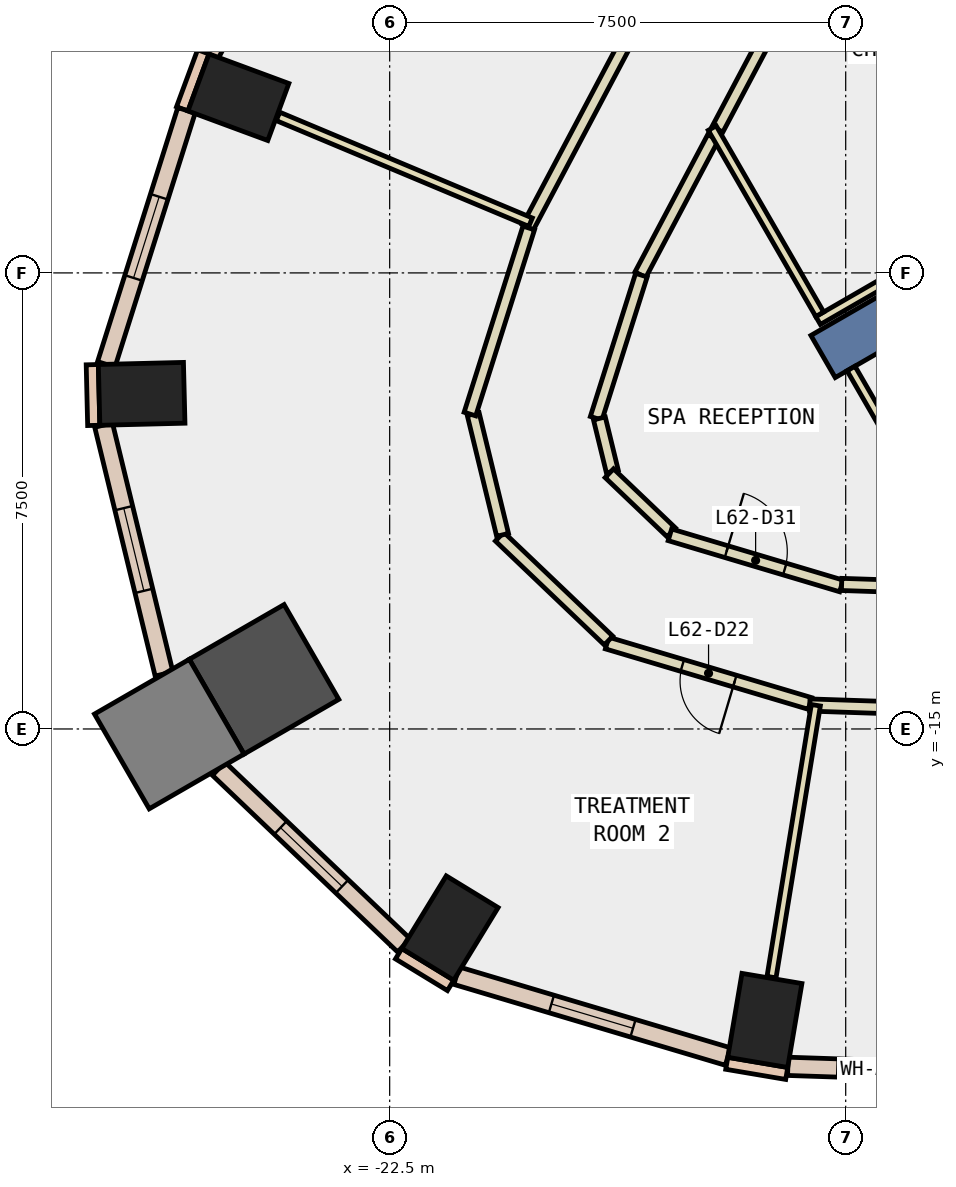
"""IFC4 building model, lengths in metres.
Left out: names, types, materials, properties, quantities, classifications, styles, units other than length and angle.
Written with IfcOpenShell. Run it as: python <this file> out.ifc"""

import sys

from ifc_helpers import new_model, si_unit, direction, frame, frame_2d, origin, origin_2d, place, context, subcontext, project, spatial, rectangle, extrude, element, fill, save


model = new_model("IFC4")
c1 = context("Model", 3, precision=1e-05, world=origin(), true_north=direction((0.0, 1.0)))
c2 = subcontext(c1, "Body", "Model", "MODEL_VIEW")
j1 = project(units=[si_unit("LENGTHUNIT", "METRE"), si_unit("PLANEANGLEUNIT", "RADIAN")], contexts=[c1])
p1 = place(None, origin())
s1 = spatial("IfcSite", under=j1, at=p1, CompositionType="ELEMENT")
p2 = place(p1, origin())
s2 = spatial("IfcBuilding", under=s1, at=p2, CompositionType="ELEMENT")
p3 = place(p2, frame((0.0, 0.0, 270.2)))
s3 = spatial("IfcBuildingStorey", under=s2, at=p3, CompositionType="ELEMENT", Elevation=270.2)
for number, where, z_axis, x_axis in (
    (1, (-16.33, -19.793, -0.34), (0.0, 0.0, 1.0), (-0.986, 0.167, 0.0)),
    (2, (-24.988, -4.611, -0.34), (0.0, 0.0, 1.0), (0.347, 0.938, 0.0)),
    (3, (-26.579, -9.489, -0.34), (0.0, 0.0, 1.0), (-0.025, 1.0, 0.0)),
):
    element("IfcColumn", number, at=place(p3, frame(where, z_axis=z_axis, x_axis=x_axis)), inside=s3, PredefinedType="COLUMN", context=c2, shape_type="SweptSolid", body=[
        extrude(rectangle(XDim=1.0, YDim=1.4, at=origin_2d()), origin(), (0.0, 0.0, 1.0), 3.6),
    ])
p4 = place(p3, frame((-24.566, -14.184, -0.34), z_axis=(0.0, 0.0, 1.0), x_axis=(0.866025403784, 0.5, 0.0)))
e4 = element("IfcColumn", 4, at=p4, inside=s3, PredefinedType="COLUMN", context=c2, shape_type="SweptSolid", body=[
    extrude(rectangle(XDim=1.8, YDim=1.8, at=origin_2d()), origin(), (0.0, 0.0, 1.0), 3.6),
])
p5 = place(p3, frame((-21.508, -18.274, -0.34), z_axis=(0.0, 0.0, 1.0), x_axis=(-0.853341581839, 0.521352227103, 0.0)))
e5 = element("IfcColumn", 5, at=p5, inside=s3, PredefinedType="COLUMN", context=c2, shape_type="SweptSolid", body=[
    extrude(rectangle(XDim=1.0, YDim=1.4, at=origin_2d()), origin(), (0.0, 0.0, 1.0), 3.6),
])
p6 = place(p3, frame((-26.125, -15.084, -0.34), z_axis=(0.0, 0.0, 1.0), x_axis=(0.866025403784, 0.5, 0.0)))
e6 = element("IfcColumn", 6, at=p6, inside=s3, PredefinedType="COLUMN", context=c2, shape_type="SweptSolid", body=[
    extrude(rectangle(XDim=1.8, YDim=1.8, at=origin_2d()), origin(), (0.0, 0.0, 1.0), 3.6),
])
p7 = place(p3, frame((-7.578, -4.375, -0.34), z_axis=(0.0, 0.0, 1.0), x_axis=(-0.866024315419, -0.5000018851, 0.0)))
e7 = element("IfcWall", 7, at=p7, inside=s3, PredefinedType="SHEAR", context=c2, shape_type="SweptSolid", body=[
    extrude(rectangle(XDim=9.0, YDim=0.8, at=frame_2d((4.5, 0.0))), origin(), (0.0, 0.0, 1.0), 3.6),
])
for number, where, z_axis, x_axis in (
    (8, (-25.565, -3.865, 0.0), (0.0, 0.0, 1.0), (-0.347, -0.938, 0.0)),
    (9, (-16.956, -20.498, 0.0), (0.0, 0.0, 1.0), (0.986, -0.167, 0.0)),
):
    element("IfcWall", number, at=place(p3, frame(where, z_axis=z_axis, x_axis=x_axis)), inside=s3, PredefinedType="STANDARD", context=c2, shape_type="SweptSolid", body=[
        extrude(rectangle(XDim=1.0, YDim=0.2, at=frame_2d((0.5, 0.0))), origin(), (0.0, 0.0, 1.0), 3.26),
    ])
p8 = place(p3, frame((-27.391, -9.009, 0.0), z_axis=(0.0, 0.0, 1.0), x_axis=(0.024186470916, -0.999707464524, 0.0)))
e10 = element("IfcWall", 10, at=p8, inside=s3, PredefinedType="STANDARD", context=c2, shape_type="SweptSolid", body=[
    extrude(rectangle(XDim=0.999, YDim=0.2, at=frame_2d((0.5, 0.0))), origin(), (0.0, 0.0, 1.0), 3.26),
])
p9 = place(p3, frame((-22.352, -18.696, 0.0), z_axis=(0.0, 0.0, 1.0), x_axis=(0.853679739553, -0.520798331677, 0.0)))
e11 = element("IfcWall", 11, at=p9, inside=s3, PredefinedType="STANDARD", context=c2, shape_type="SweptSolid", body=[
    extrude(rectangle(XDim=1.0, YDim=0.2, at=frame_2d((0.5, 0.0))), origin(), (0.0, 0.0, 1.0), 3.26),
])
p10 = place(p3, frame((-15.951, -20.548, 0.0), z_axis=(0.0, 0.0, 1.0), x_axis=(0.999450376985, -0.033150323459, 0.0)))
e12 = element("IfcWall", 12, at=p10, inside=s3, PredefinedType="STANDARD", context=c2, shape_type="SweptSolid", body=[
    extrude(rectangle(XDim=7.659, YDim=0.3, at=frame_2d((3.83, 0.0))), origin(), (0.0, 0.0, 1.0), 3.26),
])
p11 = place(p10, frame((0.815, 0.0, 0.9)))
e13 = element("IfcOpeningElement", 13, at=p11, cuts=e12, PredefinedType="OPENING", context=c2, shape_type="SweptSolid", body=[
    extrude(rectangle(XDim=2.2, YDim=2.0, at=frame_2d((1.1, 1.0))), frame((0.0, 0.16, 0.0), z_axis=(0.0, -1.0, 0.0), x_axis=(1.0, 0.0, 0.0)), (0.0, 0.0, 1.0), 0.32),
])
p12 = place(p10, frame((4.644, 0.0, 0.9)))
e14 = element("IfcOpeningElement", 14, at=p12, cuts=e12, PredefinedType="OPENING", context=c2, shape_type="SweptSolid", body=[
    extrude(rectangle(XDim=2.2, YDim=2.0, at=frame_2d((1.1, 1.0))), frame((0.0, 0.16, 0.0), z_axis=(0.0, -1.0, 0.0), x_axis=(1.0, 0.0, 0.0)), (0.0, 0.0, 1.0), 0.32),
])
p13 = place(p3, frame((-22.784, 1.132, 0.0), z_axis=(0.0, 0.0, 1.0), x_axis=(-0.468220106253, -0.883611867338, 0.0)))
e15 = element("IfcWall", 15, at=p13, inside=s3, PredefinedType="STANDARD", context=c2, shape_type="SweptSolid", body=[
    extrude(rectangle(XDim=5.703, YDim=0.3, at=frame_2d((2.852, 0.0))), origin(), (0.0, 0.0, 1.0), 3.26),
])
p14 = place(p13, frame((0.476, 0.0, 0.9)))
e16 = element("IfcOpeningElement", 16, at=p14, cuts=e15, PredefinedType="OPENING", context=c2, shape_type="SweptSolid", body=[
    extrude(rectangle(XDim=1.9, YDim=2.0, at=frame_2d((0.95, 1.0))), frame((0.0, 0.16, 0.0), z_axis=(0.0, -1.0, 0.0), x_axis=(1.0, 0.0, 0.0)), (0.0, 0.0, 1.0), 0.32),
])
p15 = place(p13, frame((3.327, 0.0, 0.9)))
e17 = element("IfcOpeningElement", 17, at=p15, cuts=e15, PredefinedType="OPENING", context=c2, shape_type="SweptSolid", body=[
    extrude(rectangle(XDim=1.9, YDim=2.0, at=frame_2d((0.95, 1.0))), frame((0.0, 0.16, 0.0), z_axis=(0.0, -1.0, 0.0), x_axis=(1.0, 0.0, 0.0)), (0.0, 0.0, 1.0), 0.32),
])
p16 = place(p3, frame((-25.842, -4.827, 0.0), z_axis=(0.0, 0.0, 1.0), x_axis=(-0.30108868778, -0.953596142028, 0.0)))
e18 = element("IfcWall", 18, at=p16, inside=s3, PredefinedType="STANDARD", context=c2, shape_type="SweptSolid", body=[
    extrude(rectangle(XDim=4.38, YDim=0.3, at=frame_2d((2.19, 0.0))), origin(), (0.0, 0.0, 1.0), 3.26),
])
p17 = place(p16, frame((1.49, 0.0, 0.9)))
e19 = element("IfcOpeningElement", 19, at=p17, cuts=e18, PredefinedType="OPENING", context=c2, shape_type="SweptSolid", body=[
    extrude(rectangle(XDim=1.4, YDim=2.0, at=frame_2d((0.7, 1.0))), frame((0.0, 0.16, 0.0), z_axis=(0.0, -1.0, 0.0), x_axis=(1.0, 0.0, 0.0)), (0.0, 0.0, 1.0), 0.32),
])
p18 = place(p3, frame((-27.205, -10.003, 0.0), z_axis=(0.0, 0.0, 1.0), x_axis=(0.236077883519, -0.97173413695, 0.0)))
e20 = element("IfcWall", 20, at=p18, inside=s3, PredefinedType="STANDARD", context=c2, shape_type="SweptSolid", body=[
    extrude(rectangle(XDim=4.211, YDim=0.3, at=frame_2d((2.105, 0.0))), origin(), (0.0, 0.0, 1.0), 3.26),
])
p19 = place(p18, frame((1.405, 0.0, 0.9)))
e21 = element("IfcOpeningElement", 21, at=p19, cuts=e20, PredefinedType="OPENING", context=c2, shape_type="SweptSolid", body=[
    extrude(rectangle(XDim=1.4, YDim=2.0, at=frame_2d((0.7, 1.0))), frame((0.0, 0.16, 0.0), z_axis=(0.0, -1.0, 0.0), x_axis=(1.0, 0.0, 0.0)), (0.0, 0.0, 1.0), 0.32),
])
p20 = place(p3, frame((-25.312, -15.653, 0.0), z_axis=(0.0, 0.0, 1.0), x_axis=(0.723526681061, -0.690296415892, 0.0)))
e22 = element("IfcWall", 22, at=p20, inside=s3, PredefinedType="STANDARD", context=c2, shape_type="SweptSolid", body=[
    extrude(rectangle(XDim=4.21, YDim=0.3, at=frame_2d((2.105, 0.0))), origin(), (0.0, 0.0, 1.0), 3.26),
])
p21 = place(p20, frame((1.405, 0.0, 0.9)))
e23 = element("IfcOpeningElement", 23, at=p21, cuts=e22, PredefinedType="OPENING", context=c2, shape_type="SweptSolid", body=[
    extrude(rectangle(XDim=1.4, YDim=2.0, at=frame_2d((0.7, 1.0))), frame((0.0, 0.16, 0.0), z_axis=(0.0, -1.0, 0.0), x_axis=(1.0, 0.0, 0.0)), (0.0, 0.0, 1.0), 0.32),
])
p22 = place(p3, frame((-21.401, -19.057, 0.0), z_axis=(0.0, 0.0, 1.0), x_axis=(0.958361270465, -0.285558532131, 0.0)))
e24 = element("IfcWall", 24, at=p22, inside=s3, PredefinedType="STANDARD", context=c2, shape_type="SweptSolid", body=[
    extrude(rectangle(XDim=4.658, YDim=0.3, at=frame_2d((2.329, 0.0))), origin(), (0.0, 0.0, 1.0), 3.26),
])
p23 = place(p22, frame((1.629, 0.0, 0.9)))
e25 = element("IfcOpeningElement", 25, at=p23, cuts=e24, PredefinedType="OPENING", context=c2, shape_type="SweptSolid", body=[
    extrude(rectangle(XDim=1.4, YDim=2.0, at=frame_2d((0.7, 1.0))), frame((0.0, 0.16, 0.0), z_axis=(0.0, -1.0, 0.0), x_axis=(1.0, 0.0, 0.0)), (0.0, 0.0, 1.0), 0.32),
])
p24 = place(p3, frame((-15.56, -2.214, 0.0), z_axis=(0.0, 0.0, 1.0), x_axis=(-0.468104679961, -0.883673021314, 0.0)))
e26 = element("IfcWall", 26, at=p24, inside=s3, PredefinedType="PARTITIONING", context=c2, shape_type="SweptSolid", body=[
    extrude(rectangle(XDim=3.309, YDim=0.2, at=frame_2d((1.654, 0.0))), origin(), (0.0, 0.0, 1.0), 3.26),
])
p25 = place(p3, frame((-17.18, -5.271, 0.0), z_axis=(0.0, 0.0, 1.0), x_axis=(-0.468212372113, -0.883615965564, 0.0)))
e27 = element("IfcWall", 27, at=p25, inside=s3, PredefinedType="PARTITIONING", context=c2, shape_type="SweptSolid", body=[
    extrude(rectangle(XDim=2.557, YDim=0.2, at=frame_2d((1.278, 0.0))), origin(), (0.0, 0.0, 1.0), 3.26),
])
p26 = place(p3, frame((-18.36, -7.537, 0.0), z_axis=(0.0, 0.0, 1.0), x_axis=(-0.301325410186, -0.953521366922, 0.0)))
e28 = element("IfcWall", 28, at=p26, inside=s3, PredefinedType="PARTITIONING", context=c2, shape_type="SweptSolid", body=[
    extrude(rectangle(XDim=2.469, YDim=0.2, at=frame_2d((1.234, 0.0))), origin(), (0.0, 0.0, 1.0), 3.26),
])
p27 = place(p3, frame((-19.051, -9.893, 0.0), z_axis=(0.0, 0.0, 1.0), x_axis=(0.237162553963, -0.971469980492, 0.0)))
e29 = element("IfcWall", 29, at=p27, inside=s3, PredefinedType="PARTITIONING", context=c2, shape_type="SweptSolid", body=[
    extrude(rectangle(XDim=0.899, YDim=0.2, at=frame_2d((0.449, 0.0))), origin(), (0.0, 0.0, 1.0), 3.26),
])
p28 = place(p3, frame((-18.887, -10.794, 0.0), z_axis=(0.0, 0.0, 1.0), x_axis=(0.723206051435, -0.690632324155, 0.0)))
e30 = element("IfcWall", 30, at=p28, inside=s3, PredefinedType="PARTITIONING", context=c2, shape_type="SweptSolid", body=[
    extrude(rectangle(XDim=1.409, YDim=0.2, at=frame_2d((0.705, 0.0))), origin(), (0.0, 0.0, 1.0), 3.26),
])
p29 = place(p3, frame((-17.891, -11.807, 0.0), z_axis=(0.0, 0.0, 1.0), x_axis=(0.958288558025, -0.28580244848, 0.0)))
e31 = element("IfcWall", 31, at=p29, inside=s3, PredefinedType="PARTITIONING", context=c2, shape_type="SweptSolid", body=[
    extrude(rectangle(XDim=2.943, YDim=0.2, at=frame_2d((1.471, 0.0))), origin(), (0.0, 0.0, 1.0), 3.26),
])
p30 = place(p29, frame((0.971, 0.0, 0.0)))
e32 = element("IfcOpeningElement", 32, at=p30, cuts=e31, PredefinedType="OPENING", context=c2, shape_type="SweptSolid", body=[
    extrude(rectangle(XDim=1.0, YDim=2.1, at=frame_2d((0.5, 1.05))), frame((0.0, 0.11, 0.0), z_axis=(0.0, -1.0, 0.0), x_axis=(1.0, 0.0, 0.0)), (0.0, 0.0, 1.0), 0.22),
])
p31 = place(p3, frame((-15.067, -12.623, 0.0), z_axis=(0.0, 0.0, 1.0), x_axis=(0.99945112134, -0.033127874247, 0.0)))
e33 = element("IfcWall", 33, at=p31, inside=s3, PredefinedType="PARTITIONING", context=c2, shape_type="SweptSolid", body=[
    extrude(rectangle(XDim=2.174, YDim=0.2, at=frame_2d((1.087, 0.0))), origin(), (0.0, 0.0, 1.0), 3.26),
])
p32 = place(p3, frame((-20.229, -6.754, 0.0), z_axis=(0.0, 0.0, 1.0), x_axis=(0.468313568794, 0.883562335822, 0.0)))
e34 = element("IfcWall", 34, at=p32, inside=s3, PredefinedType="PARTITIONING", context=c2, shape_type="SweptSolid", body=[
    extrude(rectangle(XDim=6.216, YDim=0.2, at=frame_2d((3.108, 0.0))), origin(), (0.0, 0.0, 1.0), 3.26),
])
p33 = place(p3, frame((-15.587, -14.581, 0.0), z_axis=(0.0, 0.0, 1.0), x_axis=(-0.958378336681, 0.285501250052, 0.0)))
e35 = element("IfcWall", 35, at=p33, inside=s3, PredefinedType="PARTITIONING", context=c2, shape_type="SweptSolid", body=[
    extrude(rectangle(XDim=3.482, YDim=0.2, at=frame_2d((1.741, 0.0))), origin(), (0.0, 0.0, 1.0), 3.26),
])
p34 = place(p33, frame((1.291, 0.0, 0.0)))
e36 = element("IfcOpeningElement", 36, at=p34, cuts=e35, PredefinedType="OPENING", context=c2, shape_type="SweptSolid", body=[
    extrude(rectangle(XDim=0.9, YDim=2.1, at=frame_2d((0.45, 1.05))), frame((0.0, 0.11, 0.0), z_axis=(0.0, -1.0, 0.0), x_axis=(1.0, 0.0, 0.0)), (0.0, 0.0, 1.0), 0.22),
])
p35 = place(p3, frame((-18.9, -13.546, 0.0), z_axis=(0.0, 0.0, 1.0), x_axis=(-0.723668833869, 0.690147389248, 0.0)))
e37 = element("IfcWall", 37, at=p35, inside=s3, PredefinedType="PARTITIONING", context=c2, shape_type="SweptSolid", body=[
    extrude(rectangle(XDim=2.476, YDim=0.2, at=frame_2d((1.238, 0.0))), origin(), (0.0, 0.0, 1.0), 3.26),
])
p36 = place(p3, frame((-20.643, -11.808, 0.0), z_axis=(0.0, 0.0, 1.0), x_axis=(-0.236372924437, 0.971662410816, 0.0)))
e38 = element("IfcWall", 38, at=p36, inside=s3, PredefinedType="PARTITIONING", context=c2, shape_type="SweptSolid", body=[
    extrude(rectangle(XDim=2.043, YDim=0.2, at=frame_2d((1.021, 0.0))), origin(), (0.0, 0.0, 1.0), 3.26),
])
p37 = place(p3, frame((-21.18, -9.821, 0.0), z_axis=(0.0, 0.0, 1.0), x_axis=(0.301331608119, 0.953519408271, 0.0)))
e39 = element("IfcWall", 39, at=p37, inside=s3, PredefinedType="PARTITIONING", context=c2, shape_type="SweptSolid", body=[
    extrude(rectangle(XDim=3.209, YDim=0.2, at=frame_2d((1.604, 0.0))), origin(), (0.0, 0.0, 1.0), 3.26),
])
p38 = place(p3, frame((-7.7, -14.869, 0.0), z_axis=(0.0, 0.0, 1.0), x_axis=(-0.999445318732, 0.03330247535, 0.0)))
e40 = element("IfcWall", 40, at=p38, inside=s3, PredefinedType="PARTITIONING", context=c2, shape_type="SweptSolid", body=[
    extrude(rectangle(XDim=7.896, YDim=0.2, at=frame_2d((3.948, 0.0))), origin(), (0.0, 0.0, 1.0), 3.26),
])
p39 = place(p38, frame((3.498, 0.0, 0.0)))
e41 = element("IfcOpeningElement", 41, at=p39, cuts=e40, PredefinedType="OPENING", context=c2, shape_type="SweptSolid", body=[
    extrude(rectangle(XDim=0.9, YDim=2.1, at=frame_2d((0.45, 1.05))), frame((0.0, 0.11, 0.0), z_axis=(0.0, -1.0, 0.0), x_axis=(1.0, 0.0, 0.0)), (0.0, 0.0, 1.0), 0.22),
])
p40 = place(p3, frame((-9.24, -4.695, 0.0), z_axis=(0.0, 0.0, 1.0), x_axis=(-0.866015037582, -0.500017954359, 0.0)))
e42 = element("IfcWall", 42, at=p40, inside=s3, PredefinedType="PARTITIONING", context=c2, shape_type="SweptSolid", body=[
    extrude(rectangle(XDim=7.176, YDim=0.15, at=frame_2d((3.588, 0.0))), origin(), (0.0, 0.0, 1.0), 3.26),
])
p41 = place(p3, frame((-15.427, -8.18, 0.0), z_axis=(0.0, 0.0, 1.0), x_axis=(-0.500045204515, 0.865999303373, 0.0)))
e43 = element("IfcWall", 43, at=p41, inside=s3, PredefinedType="PARTITIONING", context=c2, shape_type="SweptSolid", body=[
    extrude(rectangle(XDim=3.536, YDim=0.15, at=frame_2d((1.768, 0.0))), origin(), (0.0, 0.0, 1.0), 3.26),
])
p42 = place(p3, frame((-12.769, -12.784, 0.0), z_axis=(0.0, 0.0, 1.0), x_axis=(-0.499998569178, 0.866026229868, 0.0)))
e44 = element("IfcWall", 44, at=p42, inside=s3, PredefinedType="PARTITIONING", context=c2, shape_type="SweptSolid", body=[
    extrude(rectangle(XDim=4.286, YDim=0.15, at=frame_2d((2.143, 0.0))), origin(), (0.0, 0.0, 1.0), 3.26),
])
p43 = place(p3, frame((-20.183, -6.666, 0.0), z_axis=(0.0, 0.0, 1.0), x_axis=(-0.922347108299, 0.386362280525, 0.0)))
e45 = element("IfcWall", 45, at=p43, inside=s3, PredefinedType="PARTITIONING", context=c2, shape_type="SweptSolid", body=[
    extrude(rectangle(XDim=4.503, YDim=0.15, at=frame_2d((2.252, 0.0))), origin(), (0.0, 0.0, 1.0), 3.26),
])
p44 = place(p3, frame((-15.491, -14.61, 0.0), z_axis=(0.0, 0.0, 1.0), x_axis=(-0.160928343418, -0.986966092774, 0.0)))
e46 = element("IfcWall", 46, at=p44, inside=s3, PredefinedType="PARTITIONING", context=c2, shape_type="SweptSolid", body=[
    extrude(rectangle(XDim=4.53, YDim=0.15, at=frame_2d((2.265, 0.0))), origin(), (0.0, 0.0, 1.0), 3.26),
])
p45 = place(p11, origin())
e47 = element("IfcWindow", 47, at=p45, inside=s3, PartitioningType="SINGLE_PANEL", PredefinedType="WINDOW", context=c2, shape_type="SweptSolid", body=[
    extrude(rectangle(XDim=2.2, YDim=2.0, at=frame_2d((1.1, 1.0))), frame((0.0, 0.03, 0.0), z_axis=(0.0, -1.0, 0.0), x_axis=(1.0, 0.0, 0.0)), (0.0, 0.0, 1.0), 0.06),
])
fill(e13, e47)
p46 = place(p17, origin())
e48 = element("IfcWindow", 48, at=p46, inside=s3, PartitioningType="SINGLE_PANEL", PredefinedType="WINDOW", context=c2, shape_type="SweptSolid", body=[
    extrude(rectangle(XDim=1.4, YDim=2.0, at=frame_2d((0.7, 1.0))), frame((0.0, 0.03, 0.0), z_axis=(0.0, -1.0, 0.0), x_axis=(1.0, 0.0, 0.0)), (0.0, 0.0, 1.0), 0.06),
])
fill(e19, e48)
p47 = place(p19, origin())
e49 = element("IfcWindow", 49, at=p47, inside=s3, PartitioningType="SINGLE_PANEL", PredefinedType="WINDOW", context=c2, shape_type="SweptSolid", body=[
    extrude(rectangle(XDim=1.4, YDim=2.0, at=frame_2d((0.7, 1.0))), frame((0.0, 0.03, 0.0), z_axis=(0.0, -1.0, 0.0), x_axis=(1.0, 0.0, 0.0)), (0.0, 0.0, 1.0), 0.06),
])
fill(e21, e49)
p48 = place(p21, origin())
e50 = element("IfcWindow", 50, at=p48, inside=s3, PartitioningType="SINGLE_PANEL", PredefinedType="WINDOW", context=c2, shape_type="SweptSolid", body=[
    extrude(rectangle(XDim=1.4, YDim=2.0, at=frame_2d((0.7, 1.0))), frame((0.0, 0.03, 0.0), z_axis=(0.0, -1.0, 0.0), x_axis=(1.0, 0.0, 0.0)), (0.0, 0.0, 1.0), 0.06),
])
fill(e23, e50)
p49 = place(p23, origin())
e51 = element("IfcWindow", 51, at=p49, inside=s3, PartitioningType="SINGLE_PANEL", PredefinedType="WINDOW", context=c2, shape_type="SweptSolid", body=[
    extrude(rectangle(XDim=1.4, YDim=2.0, at=frame_2d((0.7, 1.0))), frame((0.0, 0.03, 0.0), z_axis=(0.0, -1.0, 0.0), x_axis=(1.0, 0.0, 0.0)), (0.0, 0.0, 1.0), 0.06),
])
fill(e25, e51)
p50 = place(p34, origin())
e52 = element("IfcDoor", 52, at=p50, inside=s3, OperationType="SINGLE_SWING_LEFT", PredefinedType="DOOR", context=c2, shape_type="SweptSolid", body=[
    extrude(rectangle(XDim=0.9, YDim=2.1, at=frame_2d((0.45, 1.05))), frame((0.0, 0.025, 0.0), z_axis=(0.0, -1.0, 0.0), x_axis=(1.0, 0.0, 0.0)), (0.0, 0.0, 1.0), 0.05),
])
fill(e36, e52)
p51 = place(p30, origin())
e53 = element("IfcDoor", 53, at=p51, inside=s3, OperationType="SINGLE_SWING_LEFT", PredefinedType="DOOR", context=c2, shape_type="SweptSolid", body=[
    extrude(rectangle(XDim=1.0, YDim=2.1, at=frame_2d((0.5, 1.05))), frame((0.0, 0.025, 0.0), z_axis=(0.0, -1.0, 0.0), x_axis=(1.0, 0.0, 0.0)), (0.0, 0.0, 1.0), 0.05),
])
fill(e32, e53)
save(model, sys.argv[1])
